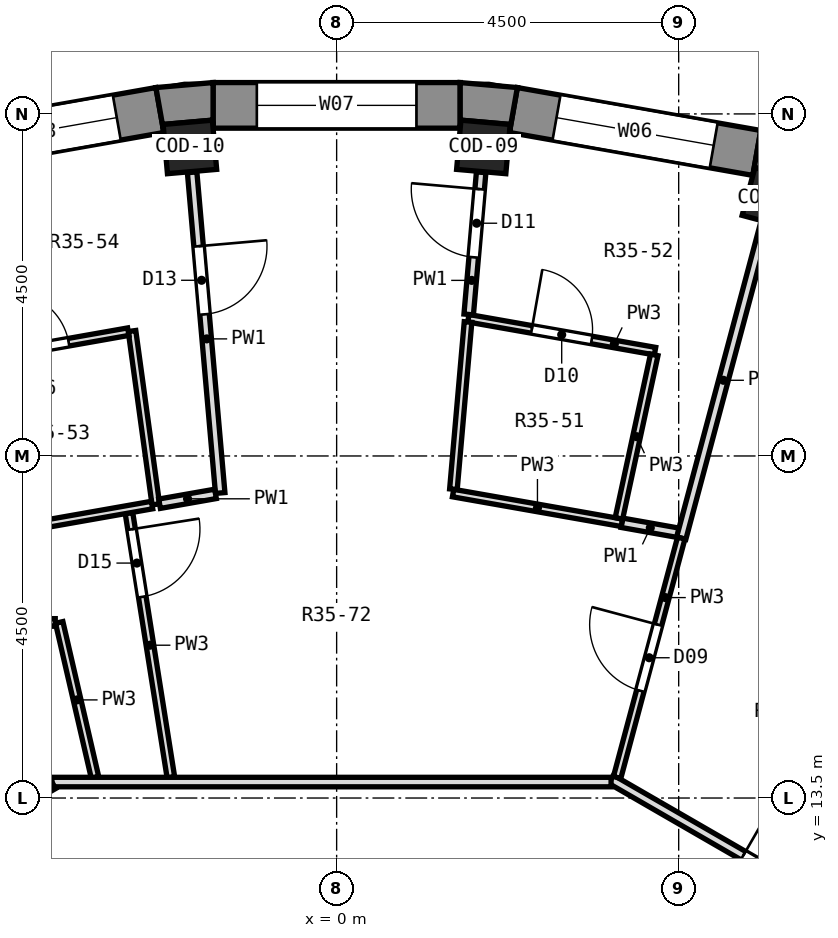
"""IFC4 building model, lengths in metres.
Left out: names, types, materials, properties, quantities, classifications, styles, units other than length and angle.
Written with IfcOpenShell. Run it as: python <this file> out.ifc"""

import sys

from ifc_helpers import new_model, si_unit, direction, frame, frame_2d, origin, origin_2d, place, context, subcontext, project, spatial, polyline, rectangle, outline, extrude, element, fill, save


model = new_model("IFC4")
c1 = context("Model", 3, precision=1e-05, world=origin(), true_north=direction((0.0, 1.0)))
c2 = subcontext(c1, "Body", "Model", "MODEL_VIEW")
j1 = project(units=[si_unit("LENGTHUNIT", "METRE"), si_unit("PLANEANGLEUNIT", "RADIAN")], contexts=[c1])
p1 = place(None, origin())
s1 = spatial("IfcSite", under=j1, at=p1, CompositionType="ELEMENT")
p2 = place(p1, origin())
s2 = spatial("IfcBuilding", under=s1, at=p2, CompositionType="ELEMENT")
p3 = place(p2, frame((0.0, 0.0, 249.5)))
s3 = spatial("IfcBuildingStorey", under=s2, at=p3, CompositionType="ELEMENT", Elevation=249.5)
for number, where, z_axis, x_axis in (
    (1, (5.733, 21.395, 0.0), (0.0, 0.0, 1.0), (0.259, 0.966, 0.0)),
    (2, (1.93, 22.066, 0.0), (0.0, 0.0, 1.0), (0.087, 0.996, 0.0)),
    (3, (-1.93, 22.066, 0.0), (0.0, 0.0, 1.0), (-0.087, 0.996, 0.0)),
):
    element("IfcColumn", number, at=place(p3, frame(where, z_axis=z_axis, x_axis=x_axis)), inside=s3, PredefinedType="COLUMN", context=c2, shape_type="SweptSolid", body=[
        extrude(rectangle(XDim=0.65, YDim=0.65, at=origin_2d()), origin(), (0.0, 0.0, 1.0), 3.3),
    ])
p4 = place(p3, frame((5.528, 21.987, 0.0), z_axis=(0.0, 0.0, 1.0), x_axis=(-0.984806225186, 0.173656842178, 0.0)))
e4 = element("IfcWall", 4, at=p4, inside=s3, PredefinedType="SOLIDWALL", context=c2, shape_type="SweptSolid", body=[
    extrude(rectangle(XDim=3.252, YDim=0.6, at=frame_2d((1.626, 0.0))), origin(), (0.0, 0.0, 1.0), 2.9),
])
p5 = place(p4, frame((0.576, 0.0, 0.9)))
e5 = element("IfcOpeningElement", 5, at=p5, cuts=e4, PredefinedType="OPENING", context=c2, shape_type="SweptSolid", body=[
    extrude(rectangle(XDim=2.1, YDim=1.8, at=frame_2d((1.05, 0.9))), frame((0.0, 0.312, 0.0), z_axis=(0.0, -1.0, 0.0), x_axis=(1.0, 0.0, 0.0)), (0.0, 0.0, 1.0), 0.624),
])
p6 = place(p3, frame((1.626, 22.613, 0.0), z_axis=(0.0, 0.0, 1.0), x_axis=(-1.0, 0.0, 0.0)))
e6 = element("IfcWall", 6, at=p6, inside=s3, PredefinedType="SOLIDWALL", context=c2, shape_type="SweptSolid", body=[
    extrude(rectangle(XDim=3.251, YDim=0.6, at=frame_2d((1.626, 0.0))), origin(), (0.0, 0.0, 1.0), 2.9),
])
p7 = place(p6, frame((0.576, 0.0, 0.9)))
e7 = element("IfcOpeningElement", 7, at=p7, cuts=e6, PredefinedType="OPENING", context=c2, shape_type="SweptSolid", body=[
    extrude(rectangle(XDim=2.1, YDim=1.8, at=frame_2d((1.05, 0.9))), frame((0.0, 0.312, 0.0), z_axis=(0.0, -1.0, 0.0), x_axis=(1.0, 0.0, 0.0)), (0.0, 0.0, 1.0), 0.624),
])
p8 = place(p3, frame((-2.325, 22.551, 0.0), z_axis=(0.0, 0.0, 1.0), x_axis=(-0.984806225186, -0.173656842178, 0.0)))
e8 = element("IfcWall", 8, at=p8, inside=s3, PredefinedType="SOLIDWALL", context=c2, shape_type="SweptSolid", body=[
    extrude(rectangle(XDim=3.252, YDim=0.6, at=frame_2d((1.626, 0.0))), origin(), (0.0, 0.0, 1.0), 2.9),
])
p9 = place(p8, frame((0.576, 0.0, 0.9)))
e9 = element("IfcOpeningElement", 9, at=p9, cuts=e8, PredefinedType="OPENING", context=c2, shape_type="SweptSolid", body=[
    extrude(rectangle(XDim=2.1, YDim=1.8, at=frame_2d((1.05, 0.9))), frame((0.0, 0.312, 0.0), z_axis=(0.0, -1.0, 0.0), x_axis=(1.0, 0.0, 0.0)), (0.0, 0.0, 1.0), 0.624),
])
p10 = place(p3, origin())
e10 = element("IfcWall", 10, at=p10, inside=s3, PredefinedType="SOLIDWALL", context=c2, shape_type="SweptSolid", body=[
    extrude(outline(polyline([(5.58, 22.282), (5.476, 21.691), (5.503, 21.793), (6.131, 21.625), (6.104, 21.523), (6.309, 22.087), (5.58, 22.282)])), origin(), (0.0, 0.0, 1.0), 2.9),
])
p11 = place(p3, origin())
e11 = element("IfcWall", 11, at=p11, inside=s3, PredefinedType="SOLIDWALL", context=c2, shape_type="SweptSolid", body=[
    extrude(outline(polyline([(2.378, 22.847), (1.626, 22.913), (1.626, 22.312), (1.635, 22.418), (2.283, 22.361), (2.273, 22.256), (2.378, 22.847)])), origin(), (0.0, 0.0, 1.0), 2.9),
])
p12 = place(p3, origin())
e12 = element("IfcWall", 12, at=p12, inside=s3, PredefinedType="SOLIDWALL", context=c2, shape_type="SweptSolid", body=[
    extrude(outline(polyline([(-1.626, 22.913), (-2.378, 22.847), (-2.273, 22.256), (-2.283, 22.361), (-1.635, 22.418), (-1.626, 22.312), (-1.626, 22.913)])), origin(), (0.0, 0.0, 1.0), 2.9),
])
p13 = place(p3, frame((-1.901, 21.732, 0.0), z_axis=(0.0, 0.0, 1.0), x_axis=(0.087219152914, -0.996189148387, 0.0)))
e13 = element("IfcWall", 13, at=p13, inside=s3, PredefinedType="PARTITIONING", context=c2, shape_type="SweptSolid", body=[
    extrude(rectangle(XDim=4.235, YDim=0.125, at=frame_2d((2.118, 0.0))), origin(), (0.0, 0.0, 1.0), 2.9),
])
p14 = place(p13, frame((0.976, 0.0, 0.0)))
e14 = element("IfcOpeningElement", 14, at=p14, cuts=e13, PredefinedType="OPENING", context=c2, shape_type="SweptSolid", body=[
    extrude(rectangle(XDim=0.9, YDim=2.1, at=frame_2d((0.45, 1.05))), frame((0.0, 0.074, 0.0), z_axis=(0.0, -1.0, 0.0), x_axis=(1.0, 0.0, 0.0)), (0.0, 0.0, 1.0), 0.149),
])
p15 = place(p3, frame((-2.692, 19.644, 0.0), z_axis=(0.0, 0.0, 1.0), x_axis=(0.135941246579, -0.990716900774, 0.0)))
e15 = element("IfcWall", 15, at=p15, inside=s3, PredefinedType="PARTITIONING", context=c2, shape_type="SweptSolid", body=[
    extrude(rectangle(XDim=2.302, YDim=0.1, at=frame_2d((1.151, 0.0))), origin(), (0.0, 0.0, 1.0), 2.9),
])
p16 = place(p3, frame((-2.732, 17.25, 0.0), z_axis=(0.0, 0.0, 1.0), x_axis=(0.156624768699, -0.987658180663, 0.0)))
e16 = element("IfcWall", 16, at=p16, inside=s3, PredefinedType="PARTITIONING", context=c2, shape_type="SweptSolid", body=[
    extrude(rectangle(XDim=3.521, YDim=0.1, at=frame_2d((1.761, 0.0))), origin(), (0.0, 0.0, 1.0), 2.9),
])
p17 = place(p16, frame((0.217, 0.0, 0.0)))
e17 = element("IfcOpeningElement", 17, at=p17, cuts=e16, PredefinedType="OPENING", context=c2, shape_type="SweptSolid", body=[
    extrude(rectangle(XDim=0.9, YDim=2.1, at=frame_2d((0.45, 1.05))), frame((0.0, 0.062, 0.0), z_axis=(0.0, -1.0, 0.0), x_axis=(1.0, 0.0, 0.0)), (0.0, 0.0, 1.0), 0.124),
])
p18 = place(p3, frame((-3.65, 15.81, 0.0), z_axis=(0.0, 0.0, 1.0), x_axis=(0.22503842629, -0.974349889256, 0.0)))
e18 = element("IfcWall", 18, at=p18, inside=s3, PredefinedType="PARTITIONING", context=c2, shape_type="SweptSolid", body=[
    extrude(rectangle(XDim=2.093, YDim=0.1, at=frame_2d((1.046, 0.0))), origin(), (0.0, 0.0, 1.0), 2.9),
])
p19 = place(p3, frame((3.611, 13.747, 0.0), z_axis=(0.0, 0.0, 1.0), x_axis=(0.865964194244, -0.500106003051, 0.0)))
e19 = element("IfcWall", 19, at=p19, inside=s3, PredefinedType="PARTITIONING", context=c2, shape_type="SweptSolid", body=[
    extrude(rectangle(XDim=7.42, YDim=0.125, at=frame_2d((3.71, 0.0))), origin(), (0.0, 0.0, 1.0), 2.9),
])
p20 = place(p19, frame((2.007, 0.0, 0.0)))
e20 = element("IfcOpeningElement", 20, at=p20, cuts=e19, PredefinedType="OPENING", context=c2, shape_type="SweptSolid", body=[
    extrude(rectangle(XDim=1.0, YDim=2.1, at=frame_2d((0.5, 1.05))), frame((0.0, 0.074, 0.0), z_axis=(0.0, -1.0, 0.0), x_axis=(1.0, 0.0, 0.0)), (0.0, 0.0, 1.0), 0.149),
])
p21 = place(p3, frame((3.752, 17.121, 0.0), z_axis=(0.0, 0.0, 1.0), x_axis=(0.984637536595, -0.174610771512, 0.0)))
e21 = element("IfcWall", 21, at=p21, inside=s3, PredefinedType="PARTITIONING", context=c2, shape_type="SweptSolid", body=[
    extrude(rectangle(XDim=0.759, YDim=0.125, at=frame_2d((0.38, 0.0))), origin(), (0.0, 0.0, 1.0), 2.9),
])
p22 = place(p3, frame((1.532, 17.512, 0.0), z_axis=(0.0, 0.0, 1.0), x_axis=(0.984872829854, -0.173278703295, 0.0)))
e22 = element("IfcWall", 22, at=p22, inside=s3, PredefinedType="PARTITIONING", context=c2, shape_type="SweptSolid", body=[
    extrude(rectangle(XDim=2.254, YDim=0.1, at=frame_2d((1.127, 0.0))), origin(), (0.0, 0.0, 1.0), 2.9),
])
p23 = place(p3, frame((1.733, 19.812, 0.0), z_axis=(0.0, 0.0, 1.0), x_axis=(0.984805232191, -0.17366247335, 0.0)))
e23 = element("IfcWall", 23, at=p23, inside=s3, PredefinedType="PARTITIONING", context=c2, shape_type="SweptSolid", body=[
    extrude(rectangle(XDim=2.494, YDim=0.1, at=frame_2d((1.247, 0.0))), origin(), (0.0, 0.0, 1.0), 2.9),
])
p24 = place(p23, frame((0.847, 0.0, 0.0)))
e24 = element("IfcOpeningElement", 24, at=p24, cuts=e23, PredefinedType="OPENING", context=c2, shape_type="SweptSolid", body=[
    extrude(rectangle(XDim=0.8, YDim=2.1, at=frame_2d((0.4, 1.05))), frame((0.0, 0.062, 0.0), z_axis=(0.0, -1.0, 0.0), x_axis=(1.0, 0.0, 0.0)), (0.0, 0.0, 1.0), 0.124),
])
p25 = place(p3, frame((-3.746, 13.71, 0.0), z_axis=(0.0, 0.0, 1.0), x_axis=(1.0, 0.0, 0.0)))
e25 = element("IfcWall", 25, at=p25, inside=s3, PredefinedType="PARTITIONING", context=c2, shape_type="SweptSolid", body=[
    extrude(rectangle(XDim=7.357, YDim=0.125, at=frame_2d((3.678, 0.0))), origin(), (0.0, 0.0, 1.0), 2.9),
])
p26 = place(p3, frame((-4.295, 15.81, 0.0), z_axis=(0.0, 0.0, 1.0), x_axis=(1.0, 0.0, 0.0)))
e26 = element("IfcWall", 26, at=p26, inside=s3, PredefinedType="PARTITIONING", context=c2, shape_type="SweptSolid", body=[
    extrude(rectangle(XDim=0.593, YDim=0.1, at=frame_2d((0.296, 0.0))), origin(), (0.0, 0.0, 1.0), 2.9),
])
p27 = place(p3, frame((-4.5, 16.989, 0.0), z_axis=(0.0, 0.0, 1.0), x_axis=(0.984790568505, 0.173745607667, 0.0)))
e27 = element("IfcWall", 27, at=p27, inside=s3, PredefinedType="PARTITIONING", context=c2, shape_type="SweptSolid", body=[
    extrude(rectangle(XDim=2.104, YDim=0.1, at=frame_2d((1.052, 0.0))), origin(), (0.0, 0.0, 1.0), 2.9),
])
p28 = place(p3, frame((-2.33, 17.372, 0.0), z_axis=(0.0, 0.0, 1.0), x_axis=(0.984852515296, 0.173394126532, 0.0)))
e28 = element("IfcWall", 28, at=p28, inside=s3, PredefinedType="PARTITIONING", context=c2, shape_type="SweptSolid", body=[
    extrude(rectangle(XDim=0.748, YDim=0.125, at=frame_2d((0.374, 0.0))), origin(), (0.0, 0.0, 1.0), 2.9),
])
p29 = place(p3, frame((-5.085, 19.221, 0.0), z_axis=(0.0, 0.0, 1.0), x_axis=(0.984739131799, 0.174036899257, 0.0)))
e29 = element("IfcWall", 29, at=p29, inside=s3, PredefinedType="PARTITIONING", context=c2, shape_type="SweptSolid", body=[
    extrude(rectangle(XDim=2.381, YDim=0.1, at=frame_2d((1.19, 0.0))), origin(), (0.0, 0.0, 1.0), 2.9),
])
p30 = place(p29, frame((0.784, 0.0, 0.0)))
e30 = element("IfcOpeningElement", 30, at=p30, cuts=e29, PredefinedType="OPENING", context=c2, shape_type="SweptSolid", body=[
    extrude(rectangle(XDim=0.8, YDim=2.1, at=frame_2d((0.4, 1.05))), frame((0.0, 0.062, 0.0), z_axis=(0.0, -1.0, 0.0), x_axis=(1.0, 0.0, 0.0)), (0.0, 0.0, 1.0), 0.124),
])
p31 = place(p3, frame((-9.982, 10.067, 0.0), z_axis=(0.0, 0.0, 1.0), x_axis=(0.865972766561, 0.500091159265, 0.0)))
e31 = element("IfcWall", 31, at=p31, inside=s3, PredefinedType="PARTITIONING", context=c2, shape_type="SweptSolid", body=[
    extrude(rectangle(XDim=7.222, YDim=0.125, at=frame_2d((3.611, 0.0))), origin(), (0.0, 0.0, 1.0), 2.9),
])
p32 = place(p3, frame((4.534, 16.92, 0.0), z_axis=(0.0, 0.0, 1.0), x_axis=(0.258154015952, 0.966103774989, 0.0)))
e32 = element("IfcWall", 32, at=p32, inside=s3, PredefinedType="PARTITIONING", context=c2, shape_type="SweptSolid", body=[
    extrude(rectangle(XDim=4.298, YDim=0.125, at=frame_2d((2.149, 0.0))), origin(), (0.0, 0.0, 1.0), 2.9),
])
p33 = place(p3, frame((3.69, 13.77, 0.0), z_axis=(0.0, 0.0, 1.0), x_axis=(0.258711132493, 0.965954734925, 0.0)))
e33 = element("IfcWall", 33, at=p33, inside=s3, PredefinedType="PARTITIONING", context=c2, shape_type="SweptSolid", body=[
    extrude(rectangle(XDim=3.26, YDim=0.1, at=frame_2d((1.63, 0.0))), origin(), (0.0, 0.0, 1.0), 2.9),
])
p34 = place(p33, frame((1.181, 0.0, 0.0)))
e34 = element("IfcOpeningElement", 34, at=p34, cuts=e33, PredefinedType="OPENING", context=c2, shape_type="SweptSolid", body=[
    extrude(rectangle(XDim=0.9, YDim=2.1, at=frame_2d((0.45, 1.05))), frame((0.0, 0.062, 0.0), z_axis=(0.0, -1.0, 0.0), x_axis=(1.0, 0.0, 0.0)), (0.0, 0.0, 1.0), 0.124),
])
p35 = place(p3, frame((3.714, 17.179, 0.0), z_axis=(0.0, 0.0, 1.0), x_axis=(0.21121821869, 0.977438931133, 0.0)))
e35 = element("IfcWall", 35, at=p35, inside=s3, PredefinedType="PARTITIONING", context=c2, shape_type="SweptSolid", body=[
    extrude(rectangle(XDim=2.201, YDim=0.1, at=frame_2d((1.1, 0.0))), origin(), (0.0, 0.0, 1.0), 2.9),
])
p36 = place(p3, frame((1.536, 17.563, 0.0), z_axis=(0.0, 0.0, 1.0), x_axis=(0.087135400637, 0.996196477587, 0.0)))
e36 = element("IfcWall", 36, at=p36, inside=s3, PredefinedType="PARTITIONING", context=c2, shape_type="SweptSolid", body=[
    extrude(rectangle(XDim=2.208, YDim=0.1, at=frame_2d((1.104, 0.0))), origin(), (0.0, 0.0, 1.0), 2.9),
])
p37 = place(p3, frame((1.737, 19.862, 0.0), z_axis=(0.0, 0.0, 1.0), x_axis=(0.08726374649, 0.996185243089, 0.0)))
e37 = element("IfcWall", 37, at=p37, inside=s3, PredefinedType="PARTITIONING", context=c2, shape_type="SweptSolid", body=[
    extrude(rectangle(XDim=1.877, YDim=0.125, at=frame_2d((0.938, 0.0))), origin(), (0.0, 0.0, 1.0), 2.9),
])
p38 = place(p37, frame((0.755, 0.0, 0.0)))
e38 = element("IfcOpeningElement", 38, at=p38, cuts=e37, PredefinedType="OPENING", context=c2, shape_type="SweptSolid", body=[
    extrude(rectangle(XDim=0.9, YDim=2.1, at=frame_2d((0.45, 1.05))), frame((0.0, 0.074, 0.0), z_axis=(0.0, -1.0, 0.0), x_axis=(1.0, 0.0, 0.0)), (0.0, 0.0, 1.0), 0.149),
])
p39 = place(p5, origin())
e39 = element("IfcWindow", 39, at=p39, inside=s3, PartitioningType="SINGLE_PANEL", PredefinedType="WINDOW", context=c2, shape_type="SweptSolid", body=[
    extrude(rectangle(XDim=2.1, YDim=1.8, at=frame_2d((1.05, 0.9))), frame((0.0, 0.18, 0.0), z_axis=(0.0, -1.0, 0.0), x_axis=(1.0, 0.0, 0.0)), (0.0, 0.0, 1.0), 0.06),
])
fill(e5, e39)
p40 = place(p7, origin())
e40 = element("IfcWindow", 40, at=p40, inside=s3, PartitioningType="SINGLE_PANEL", PredefinedType="WINDOW", context=c2, shape_type="SweptSolid", body=[
    extrude(rectangle(XDim=2.1, YDim=1.8, at=frame_2d((1.05, 0.9))), frame((0.0, 0.18, 0.0), z_axis=(0.0, -1.0, 0.0), x_axis=(1.0, 0.0, 0.0)), (0.0, 0.0, 1.0), 0.06),
])
fill(e7, e40)
p41 = place(p9, origin())
e41 = element("IfcWindow", 41, at=p41, inside=s3, PartitioningType="SINGLE_PANEL", PredefinedType="WINDOW", context=c2, shape_type="SweptSolid", body=[
    extrude(rectangle(XDim=2.1, YDim=1.8, at=frame_2d((1.05, 0.9))), frame((0.0, 0.18, 0.0), z_axis=(0.0, -1.0, 0.0), x_axis=(1.0, 0.0, 0.0)), (0.0, 0.0, 1.0), 0.06),
])
fill(e9, e41)
p42 = place(p20, origin())
e42 = element("IfcDoor", 42, at=p42, inside=s3, OperationType="SINGLE_SWING_LEFT", PredefinedType="DOOR", context=c2, shape_type="SweptSolid", body=[
    extrude(rectangle(XDim=1.0, YDim=2.1, at=frame_2d((0.5, 1.05))), frame((0.0, 0.025, 0.0), z_axis=(0.0, -1.0, 0.0), x_axis=(1.0, 0.0, 0.0)), (0.0, 0.0, 1.0), 0.05),
])
fill(e20, e42)
p43 = place(p34, origin())
e43 = element("IfcDoor", 43, at=p43, inside=s3, OperationType="SINGLE_SWING_RIGHT", PredefinedType="DOOR", context=c2, shape_type="SweptSolid", body=[
    extrude(rectangle(XDim=0.9, YDim=2.1, at=frame_2d((0.45, 1.05))), frame((0.0, 0.025, 0.0), z_axis=(0.0, -1.0, 0.0), x_axis=(1.0, 0.0, 0.0)), (0.0, 0.0, 1.0), 0.05),
])
fill(e34, e43)
p44 = place(p24, origin())
e44 = element("IfcDoor", 44, at=p44, inside=s3, OperationType="SINGLE_SWING_LEFT", PredefinedType="DOOR", context=c2, shape_type="SweptSolid", body=[
    extrude(rectangle(XDim=0.8, YDim=2.1, at=frame_2d((0.4, 1.05))), frame((0.0, 0.025, 0.0), z_axis=(0.0, -1.0, 0.0), x_axis=(1.0, 0.0, 0.0)), (0.0, 0.0, 1.0), 0.05),
])
fill(e24, e44)
p45 = place(p38, origin())
e45 = element("IfcDoor", 45, at=p45, inside=s3, OperationType="SINGLE_SWING_RIGHT", PredefinedType="DOOR", context=c2, shape_type="SweptSolid", body=[
    extrude(rectangle(XDim=0.9, YDim=2.1, at=frame_2d((0.45, 1.05))), frame((0.0, 0.025, 0.0), z_axis=(0.0, -1.0, 0.0), x_axis=(1.0, 0.0, 0.0)), (0.0, 0.0, 1.0), 0.05),
])
fill(e38, e45)
p46 = place(p14, origin())
e46 = element("IfcDoor", 46, at=p46, inside=s3, OperationType="SINGLE_SWING_LEFT", PredefinedType="DOOR", context=c2, shape_type="SweptSolid", body=[
    extrude(rectangle(XDim=0.9, YDim=2.1, at=frame_2d((0.45, 1.05))), frame((0.0, 0.025, 0.0), z_axis=(0.0, -1.0, 0.0), x_axis=(1.0, 0.0, 0.0)), (0.0, 0.0, 1.0), 0.05),
])
fill(e14, e46)
p47 = place(p17, origin())
e47 = element("IfcDoor", 47, at=p47, inside=s3, OperationType="SINGLE_SWING_LEFT", PredefinedType="DOOR", context=c2, shape_type="SweptSolid", body=[
    extrude(rectangle(XDim=0.9, YDim=2.1, at=frame_2d((0.45, 1.05))), frame((0.0, 0.025, 0.0), z_axis=(0.0, -1.0, 0.0), x_axis=(1.0, 0.0, 0.0)), (0.0, 0.0, 1.0), 0.05),
])
fill(e17, e47)
p48 = place(p30, origin())
e48 = element("IfcDoor", 48, at=p48, inside=s3, OperationType="SINGLE_SWING_LEFT", PredefinedType="DOOR", context=c2, shape_type="SweptSolid", body=[
    extrude(rectangle(XDim=0.8, YDim=2.1, at=frame_2d((0.4, 1.05))), frame((0.0, 0.025, 0.0), z_axis=(0.0, -1.0, 0.0), x_axis=(1.0, 0.0, 0.0)), (0.0, 0.0, 1.0), 0.05),
])
fill(e30, e48)
save(model, sys.argv[1])
